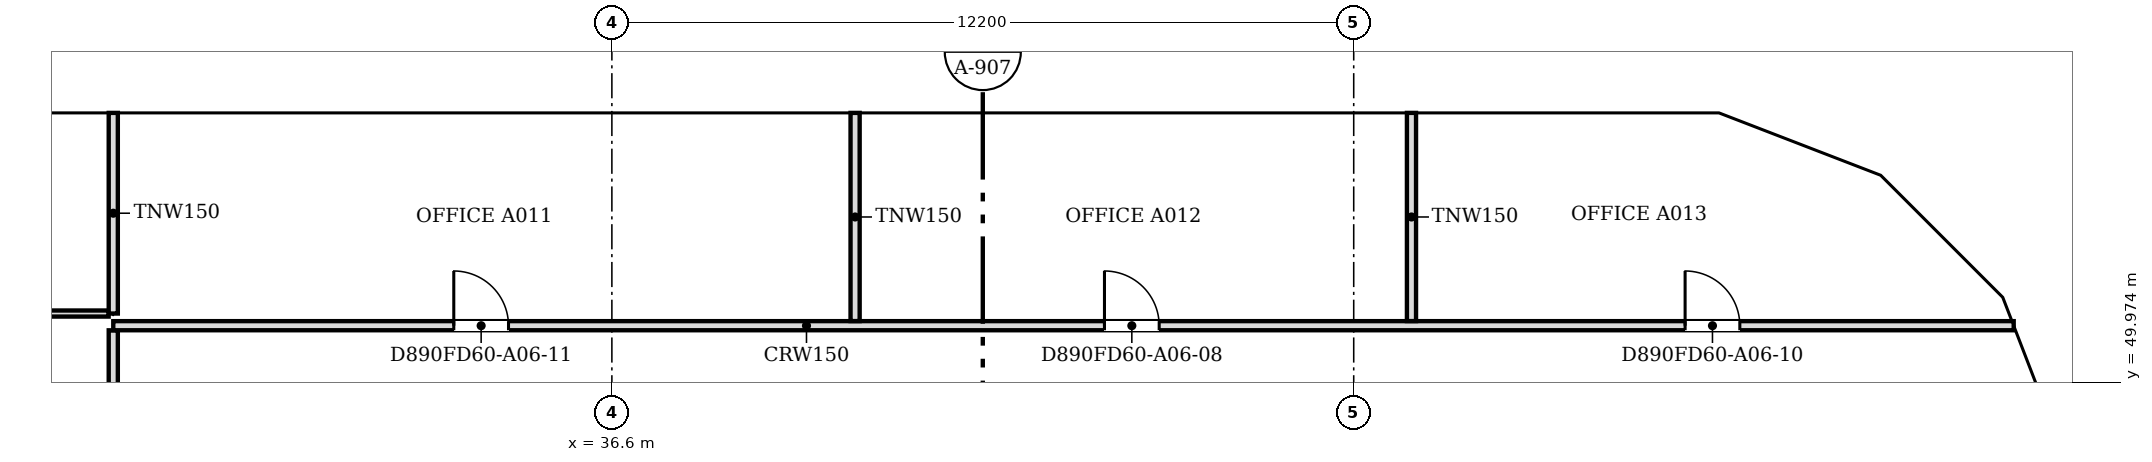
"""IFC4 building model, lengths in metres.
Left out: names, types, materials, properties, quantities, classifications, styles, units other than length and angle.
Written with IfcOpenShell. Run it as: python <this file> out.ifc"""

import sys

from ifc_helpers import new_model, si_unit, direction, frame, frame_2d, origin, place, context, subcontext, project, spatial, polyline, rectangle, outline, extrude, faceted_brep, source, transform, mapped, element, fill, save


model = new_model("IFC4")
c1 = context("Model", 3, precision=1e-05, world=origin(), true_north=direction((0.0, 1.0)))
c2 = subcontext(c1, "Body", "Model", "MODEL_VIEW")
j1 = project(units=[si_unit("LENGTHUNIT", "METRE"), si_unit("PLANEANGLEUNIT", "RADIAN")], contexts=[c1])
p1 = place(None, origin())
s1 = spatial("IfcSite", under=j1, at=p1, CompositionType="ELEMENT")
p2 = place(p1, origin())
s2 = spatial("IfcBuilding", under=s1, at=p2, CompositionType="ELEMENT")
p3 = place(p2, frame((0.0, 0.0, 72.4)))
s3 = spatial("IfcBuildingStorey", under=s2, at=p3, CompositionType="ELEMENT", Elevation=72.4)
m1 = source(origin(), c2, "Body", "Brep", [
    faceted_brep([(0.047, -0.25, 0.0), (2.997, -0.25, 3.8), (0.047, -0.25, 7.6), (0.0, -0.25, 7.541), (0.0, -0.25, 0.059), (0.093, 0.25, 7.54), (2.944, 0.25, 3.868), (2.944, 0.25, 3.732), (0.093, 0.25, 0.06), (2.997, 0.0, 3.8), (0.047, 0.0, 0.0), (0.047, 0.0, 7.6)], [[[0, 1, 2, 3, 4]], [[5, 6, 7, 8]], [[8, 7, 9, 1, 0, 10]], [[6, 5, 11, 2, 1, 9]], [[3, 2, 11]], [[10, 0, 4]], [[8, 10, 4, 3, 11, 5]], [[9, 7, 6]]]),
])
p4 = place(p3, frame((60.767, 48.71, -3.8), z_axis=(0.0, 0.0, 1.0), x_axis=(-0.359901446078, 0.932990326376, 0.0)))
e1 = element("IfcWall", 1, at=p4, inside=s3, PredefinedType="SOLIDWALL", context=c2, shape_type="MappedRepresentation", body=[
    mapped(m1, transform((0.0, 0.0, 0.0), scale=1.0)),
])
m2 = source(origin(), c2, "Body", "SweptSolid", [
    extrude(outline(polyline([(0.247, 0.665), (2.681, 3.8), (0.247, 6.935), (0.247, 0.665)])), frame((0.0, 0.26, 0.0), z_axis=(0.0, -1.0, 0.0), x_axis=(1.0, 0.0, 0.0)), (0.0, 0.0, 1.0), 0.52),
])
p5 = place(p4, origin())
e2 = element("IfcOpeningElement", 2, at=p5, cuts=e1, PredefinedType="OPENING", context=c2, shape_type="MappedRepresentation", body=[
    mapped(m2, transform((0.0, 0.0, 0.0), scale=1.0)),
])
m3 = source(origin(), c2, "Body", "Brep", [
    faceted_brep([(2.944, -0.25, 0.0), (2.997, -0.25, 0.068), (2.997, -0.25, 7.532), (2.944, -0.25, 7.6), (0.0, -0.25, 3.8), (0.053, 0.25, 3.868), (2.891, 0.25, 7.532), (2.891, 0.25, 0.068), (0.053, 0.25, 3.731), (2.944, 0.0, 0.0), (2.944, 0.0, 7.6), (0.0, 0.0, 3.8)], [[[0, 1, 2, 3, 4]], [[5, 6, 7, 8]], [[1, 0, 9]], [[10, 3, 2]], [[6, 5, 11, 4, 3, 10]], [[8, 7, 9, 0, 4, 11]], [[8, 11, 5]], [[1, 9, 7, 6, 10, 2]]]),
])
p6 = place(p3, frame((59.688, 51.506, -3.8), z_axis=(0.0, 0.0, 1.0), x_axis=(-0.707106781187, 0.707106781187, 0.0)))
e3 = element("IfcWall", 3, at=p6, inside=s3, PredefinedType="SOLIDWALL", context=c2, shape_type="MappedRepresentation", body=[
    mapped(m3, transform((0.0, 0.0, 0.0), scale=1.0)),
])
m4 = source(origin(), c2, "Body", "SweptSolid", [
    extrude(outline(polyline([(2.744, 6.934), (0.316, 3.8), (2.744, 0.666), (2.744, 6.934)])), frame((0.0, 0.26, 0.0), z_axis=(0.0, -1.0, 0.0), x_axis=(1.0, 0.0, 0.0)), (0.0, 0.0, 1.0), 0.52),
])
p7 = place(p6, origin())
e4 = element("IfcOpeningElement", 4, at=p7, cuts=e3, PredefinedType="OPENING", context=c2, shape_type="MappedRepresentation", body=[
    mapped(m4, transform((0.0, 0.0, 0.0), scale=1.0)),
])
m5 = source(origin(), c2, "Body", "Brep", [
    faceted_brep([(0.053, -0.25, 0.0), (3.003, -0.25, 3.8), (0.053, -0.25, 7.6), (0.0, -0.25, 7.531), (0.0, -0.25, 0.068), (0.106, 0.25, 7.532), (2.957, 0.25, 3.86), (2.957, 0.25, 3.74), (0.106, 0.25, 0.068), (3.003, 0.0, 3.8), (0.053, 0.0, 0.0), (0.053, 0.0, 7.6)], [[[0, 1, 2, 3, 4]], [[5, 6, 7, 8]], [[8, 7, 9, 1, 0, 10]], [[6, 5, 11, 2, 1, 9]], [[3, 2, 11]], [[10, 0, 4]], [[8, 10, 4, 3, 11, 5]], [[9, 7, 6]]]),
])
p8 = place(p3, frame((57.656, 53.569, -3.8), z_axis=(0.0, 0.0, 1.0), x_axis=(-0.933007896601, 0.359855894603, 0.0)))
e5 = element("IfcWall", 5, at=p8, inside=s3, PredefinedType="SOLIDWALL", context=c2, shape_type="MappedRepresentation", body=[
    mapped(m5, transform((0.0, 0.0, 0.0), scale=1.0)),
])
m6 = source(origin(), c2, "Body", "SweptSolid", [
    extrude(outline(polyline([(0.253, 0.665), (2.687, 3.8), (0.253, 6.935), (0.253, 0.665)])), frame((0.0, 0.26, 0.0), z_axis=(0.0, -1.0, 0.0), x_axis=(1.0, 0.0, 0.0)), (0.0, 0.0, 1.0), 0.52),
])
p9 = place(p8, origin())
e6 = element("IfcOpeningElement", 6, at=p9, cuts=e5, PredefinedType="OPENING", context=c2, shape_type="MappedRepresentation", body=[
    mapped(m6, transform((0.0, 0.0, 0.0), scale=1.0)),
])
m7 = source(origin(), c2, "Body", "Brep", [
    faceted_brep([(3.003, -0.25, 0.0), (6.053, -0.25, 3.8), (3.003, -0.25, 7.6), (0.0, -0.25, 3.8), (0.047, 0.25, 3.859), (3.003, 0.25, 7.6), (6.053, 0.25, 3.8), (3.003, 0.25, 0.0), (0.047, 0.25, 3.741), (0.0, 0.0, 3.8)], [[[0, 1, 2, 3]], [[4, 5, 6, 7, 8]], [[7, 6, 1, 0]], [[6, 5, 2, 1]], [[5, 4, 9, 3, 2]], [[8, 7, 0, 3, 9]], [[8, 9, 4]]]),
])
p10 = place(p3, frame((54.854, 54.65, -3.8), z_axis=(0.0, 0.0, 1.0), x_axis=(-1.0, 0.0, 0.0)))
e7 = element("IfcWall", 7, at=p10, inside=s3, PredefinedType="SOLIDWALL", context=c2, shape_type="MappedRepresentation", body=[
    mapped(m7, transform((0.0, 0.0, 0.0), scale=1.0)),
])
m8 = source(origin(), c2, "Body", "SweptSolid", [
    extrude(outline(polyline([(3.005, 0.401), (5.733, 3.8), (3.005, 7.199), (0.319, 3.8), (3.005, 0.401)])), frame((0.0, 0.26, 0.0), z_axis=(0.0, -1.0, 0.0), x_axis=(1.0, 0.0, 0.0)), (0.0, 0.0, 1.0), 0.52),
])
p11 = place(p10, origin())
e8 = element("IfcOpeningElement", 8, at=p11, cuts=e7, PredefinedType="OPENING", context=c2, shape_type="MappedRepresentation", body=[
    mapped(m8, transform((0.0, 0.0, 0.0), scale=1.0)),
])
m9 = source(origin(), c2, "Body", "SweptSolid", [
    extrude(outline(polyline([(3.05, 0.0), (6.1, 3.8), (3.05, 7.6), (0.0, 3.8), (3.05, 0.0)])), frame((0.0, 0.25, 0.0), z_axis=(0.0, -1.0, 0.0), x_axis=(1.0, 0.0, 0.0)), (0.0, 0.0, 1.0), 0.5),
])
p12 = place(p3, frame((48.8, 54.65, -3.8), z_axis=(0.0, 0.0, 1.0), x_axis=(-1.0, 0.0, 0.0)))
e9 = element("IfcWall", 9, at=p12, inside=s3, PredefinedType="SOLIDWALL", context=c2, shape_type="MappedRepresentation", body=[
    mapped(m9, transform((0.0, 0.0, 0.0), scale=1.0)),
])
m10 = source(origin(), c2, "Body", "SweptSolid", [
    extrude(outline(polyline([(3.05, 0.399), (5.78, 3.8), (3.05, 7.2), (0.321, 3.8), (3.05, 0.399)])), frame((0.0, 0.26, 0.0), z_axis=(0.0, -1.0, 0.0), x_axis=(1.0, 0.0, 0.0)), (0.0, 0.0, 1.0), 0.52),
])
p13 = place(p12, origin())
e10 = element("IfcOpeningElement", 10, at=p13, cuts=e9, PredefinedType="OPENING", context=c2, shape_type="MappedRepresentation", body=[
    mapped(m10, transform((0.0, 0.0, 0.0), scale=1.0)),
])
m11 = source(origin(), c2, "Body", "Brep", [
    faceted_brep([(3.05, -0.25, 0.0), (6.1, -0.25, 3.8), (6.1, -0.25, 3.8), (3.05, -0.25, 7.6), (0.0, -0.25, 3.8), (0.0, 0.25, 3.8), (3.05, 0.25, 7.6), (6.1, 0.25, 3.8), (6.1, 0.25, 3.8), (3.05, 0.25, 0.0)], [[[0, 1, 2, 3, 4]], [[5, 6, 7, 8, 9]], [[9, 8, 1, 0]], [[7, 6, 3, 2]], [[6, 5, 4, 3]], [[5, 9, 0, 4]], [[1, 8, 7, 2]]]),
])
p14 = place(p3, frame((42.7, 54.65, -3.8), z_axis=(0.0, 0.0, 1.0), x_axis=(-1.0, 0.0, 0.0)))
e11 = element("IfcWall", 11, at=p14, inside=s3, PredefinedType="SOLIDWALL", context=c2, shape_type="MappedRepresentation", body=[
    mapped(m11, transform((0.0, 0.0, 0.0), scale=1.0)),
])
p15 = place(p14, origin())
e12 = element("IfcOpeningElement", 12, at=p15, cuts=e11, PredefinedType="OPENING", context=c2, shape_type="MappedRepresentation", body=[
    mapped(m10, transform((0.0, 0.0, 0.0), scale=1.0)),
])
p16 = place(p3, frame((36.6, 54.65, -3.8), z_axis=(0.0, 0.0, 1.0), x_axis=(-1.0, 0.0, 0.0)))
e13 = element("IfcWall", 13, at=p16, inside=s3, PredefinedType="SOLIDWALL", context=c2, shape_type="MappedRepresentation", body=[
    mapped(m9, transform((0.0, 0.0, 0.0), scale=1.0)),
])
p17 = place(p16, origin())
e14 = element("IfcOpeningElement", 14, at=p17, cuts=e13, PredefinedType="OPENING", context=c2, shape_type="MappedRepresentation", body=[
    mapped(m10, transform((0.0, 0.0, 0.0), scale=1.0)),
])
p18 = place(p3, frame((30.5, 54.65, -3.8), z_axis=(0.0, 0.0, 1.0), x_axis=(-1.0, 0.0, 0.0)))
e15 = element("IfcWall", 15, at=p18, inside=s3, PredefinedType="SOLIDWALL", context=c2, shape_type="MappedRepresentation", body=[
    mapped(m9, transform((0.0, 0.0, 0.0), scale=1.0)),
])
p19 = place(p18, origin())
e16 = element("IfcOpeningElement", 16, at=p19, cuts=e15, PredefinedType="OPENING", context=c2, shape_type="MappedRepresentation", body=[
    mapped(m10, transform((0.0, 0.0, 0.0), scale=1.0)),
])
p20 = place(p2, frame((0.0, 0.0, 76.2)))
s4 = spatial("IfcBuildingStorey", under=s2, at=p20, CompositionType="ELEMENT", Elevation=76.2)
m12 = source(origin(), c2, "Body", "Brep", [
    faceted_brep([(2.95, -0.25, 0.0), (3.003, -0.25, 0.068), (3.003, -0.25, 7.532), (2.95, -0.25, 7.6), (0.0, -0.25, 3.8), (0.047, 0.25, 3.86), (2.898, 0.25, 7.532), (2.898, 0.25, 0.068), (0.047, 0.25, 3.74), (2.95, 0.0, 0.0), (2.95, 0.0, 7.6), (0.0, 0.0, 3.8)], [[[0, 1, 2, 3, 4]], [[5, 6, 7, 8]], [[1, 0, 9]], [[10, 3, 2]], [[6, 5, 11, 4, 3, 10]], [[8, 7, 9, 0, 4, 11]], [[8, 11, 5]], [[1, 9, 7, 6, 10, 2]]]),
])
p21 = place(p20, frame((60.75, 48.753, -3.8), z_axis=(0.0, 0.0, 1.0), x_axis=(-0.35992665181, 0.932980602862, 0.0)))
e17 = element("IfcWall", 17, at=p21, inside=s4, PredefinedType="SOLIDWALL", context=c2, shape_type="MappedRepresentation", body=[
    mapped(m12, transform((0.0, 0.0, 0.0), scale=1.0)),
])
m13 = source(origin(), c2, "Body", "SweptSolid", [
    extrude(outline(polyline([(2.75, 6.935), (0.316, 3.8), (2.75, 0.665), (2.75, 6.935)])), frame((0.0, 0.26, 0.0), z_axis=(0.0, -1.0, 0.0), x_axis=(1.0, 0.0, 0.0)), (0.0, 0.0, 1.0), 0.52),
])
p22 = place(p21, origin())
e18 = element("IfcOpeningElement", 18, at=p22, cuts=e17, PredefinedType="OPENING", context=c2, shape_type="MappedRepresentation", body=[
    mapped(m13, transform((0.0, 0.0, 0.0), scale=1.0)),
])
m14 = source(origin(), c2, "Body", "Brep", [
    faceted_brep([(0.053, -0.25, 0.0), (2.997, -0.25, 3.8), (0.053, -0.25, 7.6), (0.0, -0.25, 7.532), (0.0, -0.25, 0.068), (0.106, 0.25, 7.532), (2.944, 0.25, 3.868), (2.944, 0.25, 3.732), (0.106, 0.25, 0.068), (2.997, 0.0, 3.8), (0.053, 0.0, 0.0), (0.053, 0.0, 7.6)], [[[0, 1, 2, 3, 4]], [[5, 6, 7, 8]], [[8, 7, 9, 1, 0, 10]], [[6, 5, 11, 2, 1, 9]], [[3, 2, 11]], [[10, 0, 4]], [[8, 10, 4, 3, 11, 5]], [[9, 7, 6]]]),
])
p23 = place(p20, frame((59.726, 51.469, -3.8), z_axis=(0.0, 0.0, 1.0), x_axis=(-0.707106781187, 0.707106781187, 0.0)))
e19 = element("IfcWall", 19, at=p23, inside=s4, PredefinedType="SOLIDWALL", context=c2, shape_type="MappedRepresentation", body=[
    mapped(m14, transform((0.0, 0.0, 0.0), scale=1.0)),
])
m15 = source(origin(), c2, "Body", "SweptSolid", [
    extrude(outline(polyline([(0.253, 0.667), (2.681, 3.8), (0.253, 6.934), (0.253, 0.667)])), frame((0.0, 0.26, 0.0), z_axis=(0.0, -1.0, 0.0), x_axis=(1.0, 0.0, 0.0)), (0.0, 0.0, 1.0), 0.52),
])
p24 = place(p23, origin())
e20 = element("IfcOpeningElement", 20, at=p24, cuts=e19, PredefinedType="OPENING", context=c2, shape_type="MappedRepresentation", body=[
    mapped(m15, transform((0.0, 0.0, 0.0), scale=1.0)),
])
m16 = source(origin(), c2, "Body", "Brep", [
    faceted_brep([(2.95, -0.25, 0.0), (2.997, -0.25, 0.059), (2.997, -0.25, 7.541), (2.95, -0.25, 7.6), (0.0, -0.25, 3.8), (0.053, 0.25, 3.868), (2.904, 0.25, 7.54), (2.904, 0.25, 0.06), (0.053, 0.25, 3.732), (2.95, 0.0, 0.0), (2.95, 0.0, 7.6), (0.0, 0.0, 3.8)], [[[0, 1, 2, 3, 4]], [[5, 6, 7, 8]], [[1, 0, 9]], [[10, 3, 2]], [[6, 5, 11, 4, 3, 10]], [[8, 7, 9, 0, 4, 11]], [[8, 11, 5]], [[1, 9, 7, 6, 10, 2]]]),
])
p25 = place(p20, frame((57.606, 53.588, -3.8), z_axis=(0.0, 0.0, 1.0), x_axis=(-0.932990326376, 0.359901446078, 0.0)))
e21 = element("IfcWall", 21, at=p25, inside=s4, PredefinedType="SOLIDWALL", context=c2, shape_type="MappedRepresentation", body=[
    mapped(m16, transform((0.0, 0.0, 0.0), scale=1.0)),
])
p26 = place(p25, origin())
e22 = element("IfcOpeningElement", 22, at=p26, cuts=e21, PredefinedType="OPENING", context=c2, shape_type="MappedRepresentation", body=[
    mapped(m13, transform((0.0, 0.0, 0.0), scale=1.0)),
])
m17 = source(origin(), c2, "Body", "Brep", [
    faceted_brep([(0.047, -0.25, 0.0), (3.05, -0.25, 3.8), (0.047, -0.25, 7.6), (0.0, -0.25, 7.54), (0.0, -0.25, 0.06), (0.093, 0.25, 7.541), (3.05, 0.25, 3.8), (0.093, 0.25, 0.059), (0.047, 0.0, 0.0), (0.047, 0.0, 7.6)], [[[0, 1, 2, 3, 4]], [[5, 6, 7]], [[7, 6, 1, 0, 8]], [[6, 5, 9, 2, 1]], [[3, 2, 9]], [[8, 0, 4]], [[7, 8, 4, 3, 9, 5]]]),
])
p27 = place(p20, frame((54.9, 54.65, -3.8), z_axis=(0.0, 0.0, 1.0), x_axis=(-1.0, 0.0, 0.0)))
e23 = element("IfcWall", 23, at=p27, inside=s4, PredefinedType="SOLIDWALL", context=c2, shape_type="MappedRepresentation", body=[
    mapped(m17, transform((0.0, 0.0, 0.0), scale=1.0)),
])
m18 = source(origin(), c2, "Body", "SweptSolid", [
    extrude(outline(polyline([(0.247, 0.656), (2.731, 3.8), (0.247, 6.944), (0.247, 0.656)])), frame((0.0, 0.26, 0.0), z_axis=(0.0, -1.0, 0.0), x_axis=(1.0, 0.0, 0.0)), (0.0, 0.0, 1.0), 0.52),
])
p28 = place(p27, origin())
e24 = element("IfcOpeningElement", 24, at=p28, cuts=e23, PredefinedType="OPENING", context=c2, shape_type="MappedRepresentation", body=[
    mapped(m18, transform((0.0, 0.0, 0.0), scale=1.0)),
])
m19 = source(origin(), c2, "Body", "SweptSolid", [
    extrude(outline(polyline([(3.05, 0.0), (6.1, 3.8), (3.05, 7.6), (0.0, 3.8), (3.05, 0.0)])), frame((0.0, 0.25, 0.0), z_axis=(0.0, -1.0, 0.0), x_axis=(1.0, 0.0, 0.0)), (0.0, 0.0, 1.0), 0.5),
])
p29 = place(p20, frame((51.85, 54.65, -3.8), z_axis=(0.0, 0.0, 1.0), x_axis=(-1.0, 0.0, 0.0)))
e25 = element("IfcWall", 25, at=p29, inside=s4, PredefinedType="SOLIDWALL", context=c2, shape_type="MappedRepresentation", body=[
    mapped(m19, transform((0.0, 0.0, 0.0), scale=1.0)),
])
m20 = source(origin(), c2, "Body", "SweptSolid", [
    extrude(outline(polyline([(3.05, 0.399), (5.78, 3.8), (3.05, 7.201), (0.321, 3.8), (3.05, 0.399)])), frame((0.0, 0.26, 0.0), z_axis=(0.0, -1.0, 0.0), x_axis=(1.0, 0.0, 0.0)), (0.0, 0.0, 1.0), 0.52),
])
p30 = place(p29, origin())
e26 = element("IfcOpeningElement", 26, at=p30, cuts=e25, PredefinedType="OPENING", context=c2, shape_type="MappedRepresentation", body=[
    mapped(m20, transform((0.0, 0.0, 0.0), scale=1.0)),
])
p31 = place(p20, frame((45.75, 54.65, -3.8), z_axis=(0.0, 0.0, 1.0), x_axis=(-1.0, 0.0, 0.0)))
e27 = element("IfcWall", 27, at=p31, inside=s4, PredefinedType="SOLIDWALL", context=c2, shape_type="MappedRepresentation", body=[
    mapped(m19, transform((0.0, 0.0, 0.0), scale=1.0)),
])
p32 = place(p31, origin())
e28 = element("IfcOpeningElement", 28, at=p32, cuts=e27, PredefinedType="OPENING", context=c2, shape_type="MappedRepresentation", body=[
    mapped(m20, transform((0.0, 0.0, 0.0), scale=1.0)),
])
m21 = source(origin(), c2, "Body", "Brep", [
    faceted_brep([(3.05, -0.25, 0.0), (6.1, -0.25, 3.8), (6.1, -0.25, 3.8), (3.05, -0.25, 7.6), (0.0, -0.25, 3.8), (0.0, 0.25, 3.8), (3.05, 0.25, 7.6), (6.1, 0.25, 3.8), (6.1, 0.25, 3.8), (3.05, 0.25, 0.0)], [[[0, 1, 2, 3, 4]], [[5, 6, 7, 8, 9]], [[9, 8, 1, 0]], [[7, 6, 3, 2]], [[6, 5, 4, 3]], [[5, 9, 0, 4]], [[1, 8, 7, 2]]]),
])
p33 = place(p20, frame((39.65, 54.65, -3.8), z_axis=(0.0, 0.0, 1.0), x_axis=(-1.0, 0.0, 0.0)))
e29 = element("IfcWall", 29, at=p33, inside=s4, PredefinedType="SOLIDWALL", context=c2, shape_type="MappedRepresentation", body=[
    mapped(m21, transform((0.0, 0.0, 0.0), scale=1.0)),
])
p34 = place(p33, origin())
e30 = element("IfcOpeningElement", 30, at=p34, cuts=e29, PredefinedType="OPENING", context=c2, shape_type="MappedRepresentation", body=[
    mapped(m20, transform((0.0, 0.0, 0.0), scale=1.0)),
])
p35 = place(p20, frame((33.55, 54.65, -3.8), z_axis=(0.0, 0.0, 1.0), x_axis=(-1.0, 0.0, 0.0)))
e31 = element("IfcWall", 31, at=p35, inside=s4, PredefinedType="SOLIDWALL", context=c2, shape_type="MappedRepresentation", body=[
    mapped(m19, transform((0.0, 0.0, 0.0), scale=1.0)),
])
p36 = place(p35, origin())
e32 = element("IfcOpeningElement", 32, at=p36, cuts=e31, PredefinedType="OPENING", context=c2, shape_type="MappedRepresentation", body=[
    mapped(m20, transform((0.0, 0.0, 0.0), scale=1.0)),
])
p37 = place(p20, frame((27.45, 54.65, -3.8), z_axis=(0.0, 0.0, 1.0), x_axis=(-1.0, 0.0, 0.0)))
e33 = element("IfcWall", 33, at=p37, inside=s4, PredefinedType="SOLIDWALL", context=c2, shape_type="MappedRepresentation", body=[
    mapped(m21, transform((0.0, 0.0, 0.0), scale=1.0)),
])
p38 = place(p37, origin())
e34 = element("IfcOpeningElement", 34, at=p38, cuts=e33, PredefinedType="OPENING", context=c2, shape_type="MappedRepresentation", body=[
    mapped(m20, transform((0.0, 0.0, 0.0), scale=1.0)),
])
p39 = place(p3, frame((28.4, 48.176, 0.0), z_axis=(0.0, 0.0, 1.0), x_axis=(0.0, 1.0, 0.0)))
e35 = element("IfcWall", 35, at=p39, inside=s3, PredefinedType="PARTITIONING", context=c2, shape_type="SweptSolid", body=[
    extrude(rectangle(XDim=2.648, YDim=0.15, at=frame_2d((1.324, 0.0))), origin(), (0.0, 0.0, 1.0), 3.067),
])
p40 = place(p3, frame((28.4, 50.9, 0.0), z_axis=(0.0, 0.0, 1.0), x_axis=(1.0, 0.0, 0.0)))
e36 = element("IfcWall", 36, at=p40, inside=s3, PredefinedType="PARTITIONING", context=c2, shape_type="SweptSolid", body=[
    extrude(rectangle(XDim=31.254, YDim=0.15, at=frame_2d((15.627, 0.0))), origin(), (0.0, 0.0, 1.0), 3.067),
])
m22 = source(origin(), c2, "Body", "SweptSolid", [
    extrude(rectangle(XDim=0.9, YDim=2.1, at=frame_2d((0.45, 1.05))), frame((0.0, 0.085, 0.0), z_axis=(0.0, -1.0, 0.0), x_axis=(1.0, 0.0, 0.0)), (0.0, 0.0, 1.0), 0.17),
])
p41 = place(p40, frame((16.301, 0.0, 0.0)))
e37 = element("IfcOpeningElement", 37, at=p41, cuts=e36, PredefinedType="OPENING", context=c2, shape_type="MappedRepresentation", body=[
    mapped(m22, transform((0.0, 0.0, 0.0), scale=1.0)),
])
p42 = place(p40, frame((25.85, 0.0, 0.0)))
e38 = element("IfcOpeningElement", 38, at=p42, cuts=e36, PredefinedType="OPENING", context=c2, shape_type="MappedRepresentation", body=[
    mapped(m22, transform((0.0, 0.0, 0.0), scale=1.0)),
])
p43 = place(p40, frame((5.6, 0.0, 0.0)))
e39 = element("IfcOpeningElement", 39, at=p43, cuts=e36, PredefinedType="OPENING", context=c2, shape_type="MappedRepresentation", body=[
    mapped(m22, transform((0.0, 0.0, 0.0), scale=1.0)),
])
for number, where, z_axis, x_axis in (
    (40, (40.6, 50.976, 0.0), (0.0, 0.0, 1.0), (0.0, 1.0, 0.0)),
    (41, (49.75, 50.976, 0.0), (0.0, 0.0, 1.0), (0.0, 1.0, 0.0)),
):
    element("IfcWall", number, at=place(p3, frame(where, z_axis=z_axis, x_axis=x_axis)), inside=s3, PredefinedType="PARTITIONING", context=c2, shape_type="SweptSolid", body=[
        extrude(rectangle(XDim=3.424, YDim=0.15, at=frame_2d((1.712, 0.0))), origin(), (0.0, 0.0, 1.0), 3.067),
    ])
p44 = place(p3, frame((19.776, 51.1, 0.0), z_axis=(0.0, 0.0, 1.0), x_axis=(1.0, 0.0, 0.0)))
e42 = element("IfcWall", 42, at=p44, inside=s3, PredefinedType="PARTITIONING", context=c2, shape_type="SweptSolid", body=[
    extrude(rectangle(XDim=8.548, YDim=0.1, at=frame_2d((4.274, 0.0))), origin(), (0.0, 0.0, 1.0), 3.067),
])
m23 = source(origin(), c2, "Body", "SweptSolid", [
    extrude(rectangle(XDim=0.9, YDim=2.1, at=frame_2d((0.45, 1.05))), frame((0.0, 0.06, 0.0), z_axis=(0.0, -1.0, 0.0), x_axis=(1.0, 0.0, 0.0)), (0.0, 0.0, 1.0), 0.12),
])
p45 = place(p44, frame((1.6, 0.0, 0.0)))
e43 = element("IfcOpeningElement", 43, at=p45, cuts=e42, PredefinedType="OPENING", context=c2, shape_type="MappedRepresentation", body=[
    mapped(m23, transform((0.0, 0.0, 0.0), scale=1.0)),
])
p46 = place(p44, frame((5.927, 0.0, 0.0)))
e44 = element("IfcOpeningElement", 44, at=p46, cuts=e42, PredefinedType="OPENING", context=c2, shape_type="MappedRepresentation", body=[
    mapped(m23, transform((0.0, 0.0, 0.0), scale=1.0)),
])
p47 = place(p3, frame((28.4, 51.1, 0.0), z_axis=(0.0, 0.0, 1.0), x_axis=(0.0, 1.0, 0.0)))
e45 = element("IfcWall", 45, at=p47, inside=s3, PredefinedType="PARTITIONING", context=c2, shape_type="SweptSolid", body=[
    extrude(rectangle(XDim=3.3, YDim=0.15, at=frame_2d((1.65, 0.0))), origin(), (0.0, 0.0, 1.0), 3.067),
])
m24 = source(origin(), c2, "Body", "SweptSolid", [
    extrude(rectangle(XDim=0.9, YDim=2.1, at=frame_2d((0.45, 1.05))), frame((0.0, 0.025, 0.0), z_axis=(0.0, -1.0, 0.0), x_axis=(1.0, 0.0, 0.0)), (0.0, 0.0, 1.0), 0.05),
])
p48 = place(p41, origin())
e46 = element("IfcDoor", 46, at=p48, inside=s3, OperationType="SINGLE_SWING_LEFT", PredefinedType="DOOR", context=c2, shape_type="MappedRepresentation", body=[
    mapped(m24, transform((0.0, 0.0, 0.0), scale=1.0)),
])
fill(e37, e46)
p49 = place(p42, origin())
e47 = element("IfcDoor", 47, at=p49, inside=s3, OperationType="SINGLE_SWING_LEFT", PredefinedType="DOOR", context=c2, shape_type="MappedRepresentation", body=[
    mapped(m24, transform((0.0, 0.0, 0.0), scale=1.0)),
])
fill(e38, e47)
p50 = place(p43, origin())
e48 = element("IfcDoor", 48, at=p50, inside=s3, OperationType="SINGLE_SWING_LEFT", PredefinedType="DOOR", context=c2, shape_type="MappedRepresentation", body=[
    mapped(m24, transform((0.0, 0.0, 0.0), scale=1.0)),
])
fill(e39, e48)
save(model, sys.argv[1])
